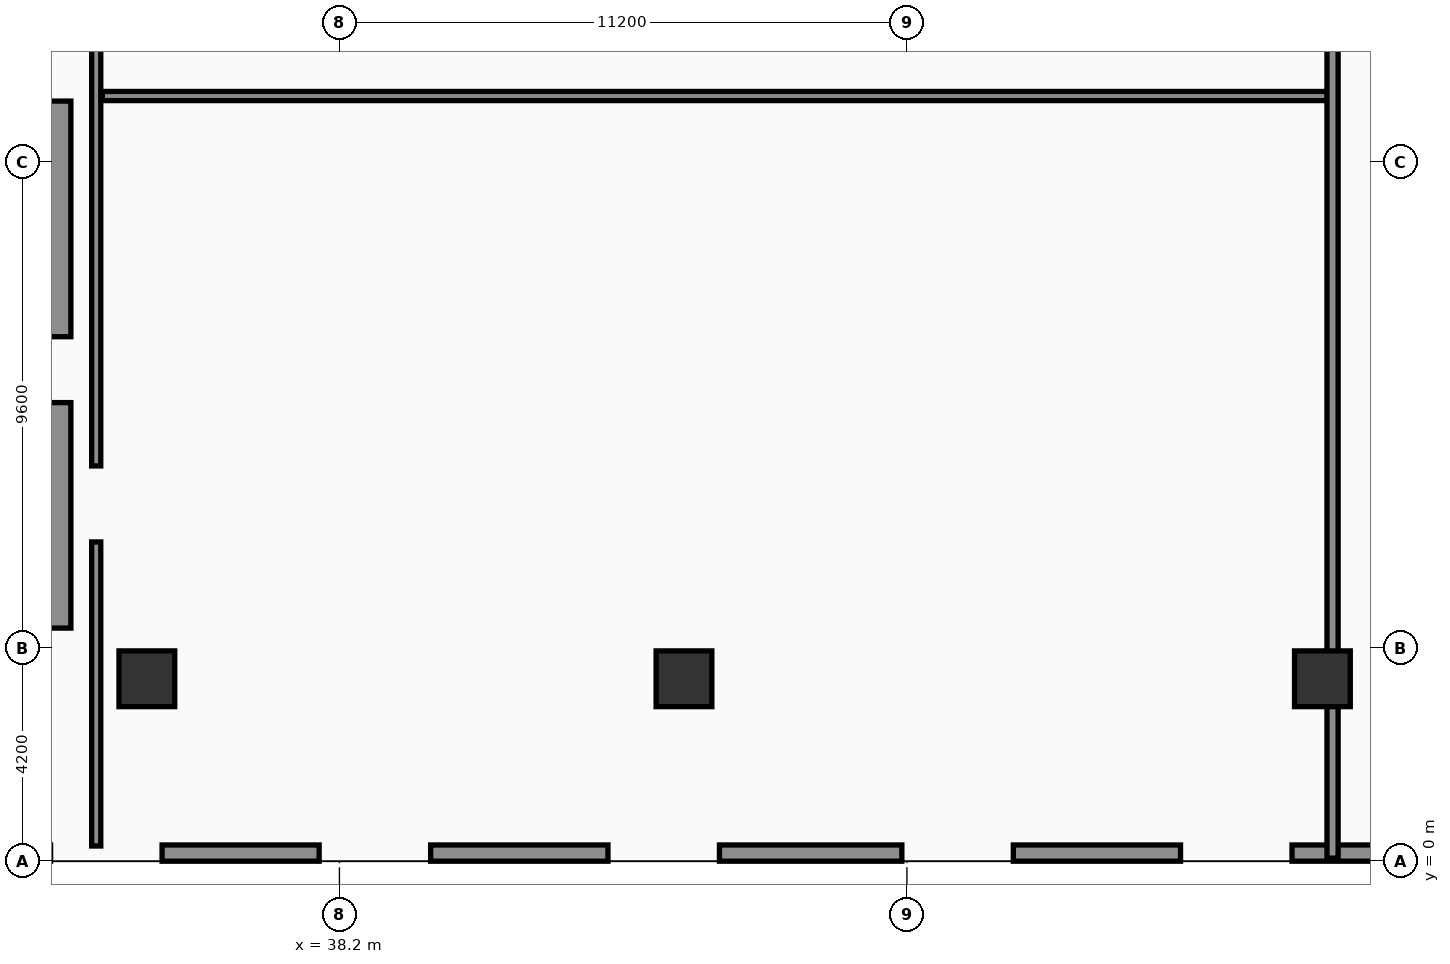
"""IFC4 building model, lengths in metres.
Left out: names, types, materials, properties, quantities, classifications, styles, units other than length and angle.
Written with IfcOpenShell. Run it as: python <this file> out.ifc"""

import sys

from ifc_helpers import new_model, si_unit, direction, frame, frame_2d, origin, origin_2d, place, context, subcontext, project, spatial, rectangle, hollow_rectangle, extrude, element, fill, save


model = new_model("IFC4")
c1 = context("Model", 3, precision=1e-05, world=origin(), true_north=direction((0.0, 1.0)))
c2 = subcontext(c1, "Body", "Model", "MODEL_VIEW")
j1 = project(units=[si_unit("LENGTHUNIT", "METRE"), si_unit("PLANEANGLEUNIT", "RADIAN")], contexts=[c1])
p1 = place(None, origin())
s1 = spatial("IfcSite", under=j1, at=p1, CompositionType="ELEMENT")
p2 = place(p1, origin())
s2 = spatial("IfcBuilding", under=s1, at=p2, CompositionType="ELEMENT")
p3 = place(p2, origin())
s3 = spatial("IfcBuildingStorey", under=s2, at=p3, CompositionType="ELEMENT", Elevation=0.0)
p4 = place(p3, frame((32.4, 4.6, 0.0), z_axis=(0.0, 0.0, 1.0), x_axis=(0.0, 1.0, 0.0)))
e1 = element("IfcWall", 1, at=p4, inside=s3, PredefinedType="SHEAR", context=c2, shape_type="SweptSolid", body=[
    extrude(rectangle(XDim=10.4, YDim=1.0, at=frame_2d((5.2, 0.0))), origin(), (0.0, 0.0, 1.0), 5.68),
])
p5 = place(p4, frame((4.45, 0.0, 0.0)))
e2 = element("IfcOpeningElement", 2, at=p5, cuts=e1, PredefinedType="OPENING", context=c2, shape_type="SweptSolid", body=[
    extrude(rectangle(XDim=1.3, YDim=2.35, at=frame_2d((0.65, 1.175))), frame((0.0, 0.51, 0.0), z_axis=(0.0, -1.0, 0.0), x_axis=(1.0, 0.0, 0.0)), (0.0, 0.0, 1.0), 1.02),
])
for number, where, z_axis, x_axis in (
    (3, (34.4, 3.6, 0.0), (0.0, 0.0, 1.0), (1.0, 0.0, 0.0)),
    (4, (45.0, 3.6, 0.0), (0.0, 0.0, 1.0), (1.0, 0.0, 0.0)),
    (5, (57.6, 3.6, 0.0), (0.0, 0.0, 1.0), (1.0, 0.0, 0.0)),
):
    element("IfcColumn", number, at=place(p3, frame(where, z_axis=z_axis, x_axis=x_axis)), inside=s3, PredefinedType="COLUMN", context=c2, shape_type="SweptSolid", body=[
        extrude(hollow_rectangle(XDim=1.1, YDim=1.1, WallThickness=0.045, at=origin_2d()), origin(), (0.0, 0.0, 1.0), 5.68),
    ])
p6 = place(p3, frame((81.7, 0.16, 0.0), z_axis=(0.0, 0.0, 1.0), x_axis=(-1.0, 0.0, 0.0)))
e6 = element("IfcWall", 6, at=p6, inside=s3, PredefinedType="SOLIDWALL", context=c2, shape_type="SweptSolid", body=[
    extrude(rectangle(XDim=79.4, YDim=0.32, at=frame_2d((39.7, 0.0))), origin(), (0.0, 0.0, 1.0), 5.68),
])
p7 = place(p6, frame((63.0, 0.0, 0.0)))
e7 = element("IfcOpeningElement", 7, at=p7, cuts=e6, PredefinedType="OPENING", context=c2, shape_type="SweptSolid", body=[
    extrude(rectangle(XDim=2.2, YDim=2.5, at=frame_2d((1.1, 1.25))), frame((0.0, 0.17, 0.0), z_axis=(0.0, -1.0, 0.0), x_axis=(1.0, 0.0, 0.0)), (0.0, 0.0, 1.0), 0.34),
])
p8 = place(p6, frame((58.4, 0.0, 0.0)))
e8 = element("IfcOpeningElement", 8, at=p8, cuts=e6, PredefinedType="OPENING", context=c2, shape_type="SweptSolid", body=[
    extrude(rectangle(XDim=2.2, YDim=2.5, at=frame_2d((1.1, 1.25))), frame((0.0, 0.17, 0.0), z_axis=(0.0, -1.0, 0.0), x_axis=(1.0, 0.0, 0.0)), (0.0, 0.0, 1.0), 0.34),
])
p9 = place(p6, frame((53.4, 0.0, 0.0)))
e9 = element("IfcOpeningElement", 9, at=p9, cuts=e6, PredefinedType="OPENING", context=c2, shape_type="SweptSolid", body=[
    extrude(rectangle(XDim=2.2, YDim=2.5, at=frame_2d((1.1, 1.25))), frame((0.0, 0.17, 0.0), z_axis=(0.0, -1.0, 0.0), x_axis=(1.0, 0.0, 0.0)), (0.0, 0.0, 1.0), 0.34),
])
p10 = place(p6, frame((47.0, 0.0, 0.0)))
e10 = element("IfcOpeningElement", 10, at=p10, cuts=e6, PredefinedType="OPENING", context=c2, shape_type="SweptSolid", body=[
    extrude(rectangle(XDim=2.2, YDim=2.5, at=frame_2d((1.1, 1.25))), frame((0.0, 0.17, 0.0), z_axis=(0.0, -1.0, 0.0), x_axis=(1.0, 0.0, 0.0)), (0.0, 0.0, 1.0), 0.34),
])
p11 = place(p6, frame((41.7, 0.0, 0.0)))
e11 = element("IfcOpeningElement", 11, at=p11, cuts=e6, PredefinedType="OPENING", context=c2, shape_type="SweptSolid", body=[
    extrude(rectangle(XDim=2.2, YDim=2.5, at=frame_2d((1.1, 1.25))), frame((0.0, 0.17, 0.0), z_axis=(0.0, -1.0, 0.0), x_axis=(1.0, 0.0, 0.0)), (0.0, 0.0, 1.0), 0.34),
])
p12 = place(p6, frame((36.0, 0.0, 0.0)))
e12 = element("IfcOpeningElement", 12, at=p12, cuts=e6, PredefinedType="OPENING", context=c2, shape_type="SweptSolid", body=[
    extrude(rectangle(XDim=2.2, YDim=2.5, at=frame_2d((1.1, 1.25))), frame((0.0, 0.17, 0.0), z_axis=(0.0, -1.0, 0.0), x_axis=(1.0, 0.0, 0.0)), (0.0, 0.0, 1.0), 0.34),
])
p13 = place(p6, frame((30.2, 0.0, 0.0)))
e13 = element("IfcOpeningElement", 13, at=p13, cuts=e6, PredefinedType="OPENING", context=c2, shape_type="SweptSolid", body=[
    extrude(rectangle(XDim=2.2, YDim=2.5, at=frame_2d((1.1, 1.25))), frame((0.0, 0.17, 0.0), z_axis=(0.0, -1.0, 0.0), x_axis=(1.0, 0.0, 0.0)), (0.0, 0.0, 1.0), 0.34),
])
p14 = place(p6, frame((24.7, 0.0, 0.0)))
e14 = element("IfcOpeningElement", 14, at=p14, cuts=e6, PredefinedType="OPENING", context=c2, shape_type="SweptSolid", body=[
    extrude(rectangle(XDim=2.2, YDim=2.5, at=frame_2d((1.1, 1.25))), frame((0.0, 0.17, 0.0), z_axis=(0.0, -1.0, 0.0), x_axis=(1.0, 0.0, 0.0)), (0.0, 0.0, 1.0), 0.34),
])
p15 = place(p6, frame((71.5, 0.0, 0.8)))
e15 = element("IfcOpeningElement", 15, at=p15, cuts=e6, PredefinedType="OPENING", context=c2, shape_type="SweptSolid", body=[
    extrude(rectangle(XDim=2.4, YDim=2.6, at=frame_2d((1.2, 1.3))), frame((0.0, 0.17, 0.0), z_axis=(0.0, -1.0, 0.0), x_axis=(1.0, 0.0, 0.0)), (0.0, 0.0, 1.0), 0.34),
])
p16 = place(p6, frame((16.5, 0.0, 0.8)))
e16 = element("IfcOpeningElement", 16, at=p16, cuts=e6, PredefinedType="OPENING", context=c2, shape_type="SweptSolid", body=[
    extrude(rectangle(XDim=2.4, YDim=2.6, at=frame_2d((1.2, 1.3))), frame((0.0, 0.17, 0.0), z_axis=(0.0, -1.0, 0.0), x_axis=(1.0, 0.0, 0.0)), (0.0, 0.0, 1.0), 0.34),
])
p17 = place(p6, frame((7.0, 0.0, 0.8)))
e17 = element("IfcOpeningElement", 17, at=p17, cuts=e6, PredefinedType="OPENING", context=c2, shape_type="SweptSolid", body=[
    extrude(rectangle(XDim=2.4, YDim=2.6, at=frame_2d((1.2, 1.3))), frame((0.0, 0.17, 0.0), z_axis=(0.0, -1.0, 0.0), x_axis=(1.0, 0.0, 0.0)), (0.0, 0.0, 1.0), 0.34),
])
p18 = place(p3, frame((33.4, 0.3, 0.0), z_axis=(0.0, 0.0, 1.0), x_axis=(0.0, 1.0, 0.0)))
e18 = element("IfcWall", 18, at=p18, inside=s3, PredefinedType="PARTITIONING", context=c2, shape_type="SweptSolid", body=[
    extrude(rectangle(XDim=57.64, YDim=0.18, at=frame_2d((28.82, 0.0))), origin(), (0.0, 0.0, 1.0), 4.88),
])
p19 = place(p18, frame((6.0, 0.0, 0.0)))
e19 = element("IfcOpeningElement", 19, at=p19, cuts=e18, PredefinedType="OPENING", context=c2, shape_type="SweptSolid", body=[
    extrude(rectangle(XDim=1.5, YDim=2.22, at=frame_2d((0.75, 1.11))), frame((0.0, 0.1, 0.0), z_axis=(0.0, -1.0, 0.0), x_axis=(1.0, 0.0, 0.0)), (0.0, 0.0, 1.0), 0.2),
])
p20 = place(p18, frame((20.0, 0.0, 0.0)))
e20 = element("IfcOpeningElement", 20, at=p20, cuts=e18, PredefinedType="OPENING", context=c2, shape_type="SweptSolid", body=[
    extrude(rectangle(XDim=1.8, YDim=2.4, at=frame_2d((0.9, 1.2))), frame((0.0, 0.1, 0.0), z_axis=(0.0, -1.0, 0.0), x_axis=(1.0, 0.0, 0.0)), (0.0, 0.0, 1.0), 0.2),
])
p21 = place(p18, frame((49.0, 0.0, 0.0)))
e21 = element("IfcOpeningElement", 21, at=p21, cuts=e18, PredefinedType="OPENING", context=c2, shape_type="SweptSolid", body=[
    extrude(rectangle(XDim=1.6, YDim=2.35, at=frame_2d((0.8, 1.175))), frame((0.0, 0.1, 0.0), z_axis=(0.0, -1.0, 0.0), x_axis=(1.0, 0.0, 0.0)), (0.0, 0.0, 1.0), 0.2),
])
p22 = place(p3, frame((33.52, 15.1, 0.0), z_axis=(0.0, 0.0, 1.0), x_axis=(1.0, 0.0, 0.0)))
e22 = element("IfcWall", 22, at=p22, inside=s3, PredefinedType="PARTITIONING", context=c2, shape_type="SweptSolid", body=[
    extrude(rectangle(XDim=24.18, YDim=0.18, at=frame_2d((12.09, 0.0))), origin(), (0.0, 0.0, 1.0), 4.18),
])
p23 = place(p3, frame((57.8, 0.06, 0.0), z_axis=(0.0, 0.0, 1.0), x_axis=(0.0, 1.0, 0.0)))
e23 = element("IfcWall", 23, at=p23, inside=s3, PredefinedType="SOLIDWALL", context=c2, shape_type="SweptSolid", body=[
    extrude(rectangle(XDim=38.84, YDim=0.22, at=frame_2d((19.42, 0.0))), origin(), (0.0, 0.0, 1.0), 4.18),
])
p24 = place(p10, origin())
e24 = element("IfcDoor", 24, at=p24, inside=s3, OperationType="DOUBLE_DOOR_SINGLE_SWING", PredefinedType="DOOR", context=c2, shape_type="SweptSolid", body=[
    extrude(rectangle(XDim=2.2, YDim=2.5, at=frame_2d((1.1, 1.25))), frame((0.0, 0.025, 0.0), z_axis=(0.0, -1.0, 0.0), x_axis=(1.0, 0.0, 0.0)), (0.0, 0.0, 1.0), 0.05),
])
fill(e10, e24)
p25 = place(p11, origin())
e25 = element("IfcDoor", 25, at=p25, inside=s3, OperationType="DOUBLE_DOOR_SINGLE_SWING", PredefinedType="DOOR", context=c2, shape_type="SweptSolid", body=[
    extrude(rectangle(XDim=2.2, YDim=2.5, at=frame_2d((1.1, 1.25))), frame((0.0, 0.025, 0.0), z_axis=(0.0, -1.0, 0.0), x_axis=(1.0, 0.0, 0.0)), (0.0, 0.0, 1.0), 0.05),
])
fill(e11, e25)
p26 = place(p12, origin())
e26 = element("IfcDoor", 26, at=p26, inside=s3, OperationType="DOUBLE_DOOR_SINGLE_SWING", PredefinedType="DOOR", context=c2, shape_type="SweptSolid", body=[
    extrude(rectangle(XDim=2.2, YDim=2.5, at=frame_2d((1.1, 1.25))), frame((0.0, 0.025, 0.0), z_axis=(0.0, -1.0, 0.0), x_axis=(1.0, 0.0, 0.0)), (0.0, 0.0, 1.0), 0.05),
])
fill(e12, e26)
p27 = place(p13, origin())
e27 = element("IfcDoor", 27, at=p27, inside=s3, OperationType="DOUBLE_DOOR_SINGLE_SWING", PredefinedType="DOOR", context=c2, shape_type="SweptSolid", body=[
    extrude(rectangle(XDim=2.2, YDim=2.5, at=frame_2d((1.1, 1.25))), frame((0.0, 0.025, 0.0), z_axis=(0.0, -1.0, 0.0), x_axis=(1.0, 0.0, 0.0)), (0.0, 0.0, 1.0), 0.05),
])
fill(e13, e27)
p28 = place(p14, origin())
e28 = element("IfcDoor", 28, at=p28, inside=s3, OperationType="DOUBLE_DOOR_SINGLE_SWING", PredefinedType="DOOR", context=c2, shape_type="SweptSolid", body=[
    extrude(rectangle(XDim=2.2, YDim=2.5, at=frame_2d((1.1, 1.25))), frame((0.0, 0.025, 0.0), z_axis=(0.0, -1.0, 0.0), x_axis=(1.0, 0.0, 0.0)), (0.0, 0.0, 1.0), 0.05),
])
fill(e14, e28)
p29 = place(p19, origin())
e29 = element("IfcDoor", 29, at=p29, inside=s3, OperationType="SINGLE_SWING_RIGHT", PredefinedType="DOOR", context=c2, shape_type="SweptSolid", body=[
    extrude(rectangle(XDim=1.5, YDim=2.22, at=frame_2d((0.75, 1.11))), frame((0.0, 0.025, 0.0), z_axis=(0.0, -1.0, 0.0), x_axis=(1.0, 0.0, 0.0)), (0.0, 0.0, 1.0), 0.05),
])
fill(e19, e29)
save(model, sys.argv[1])
